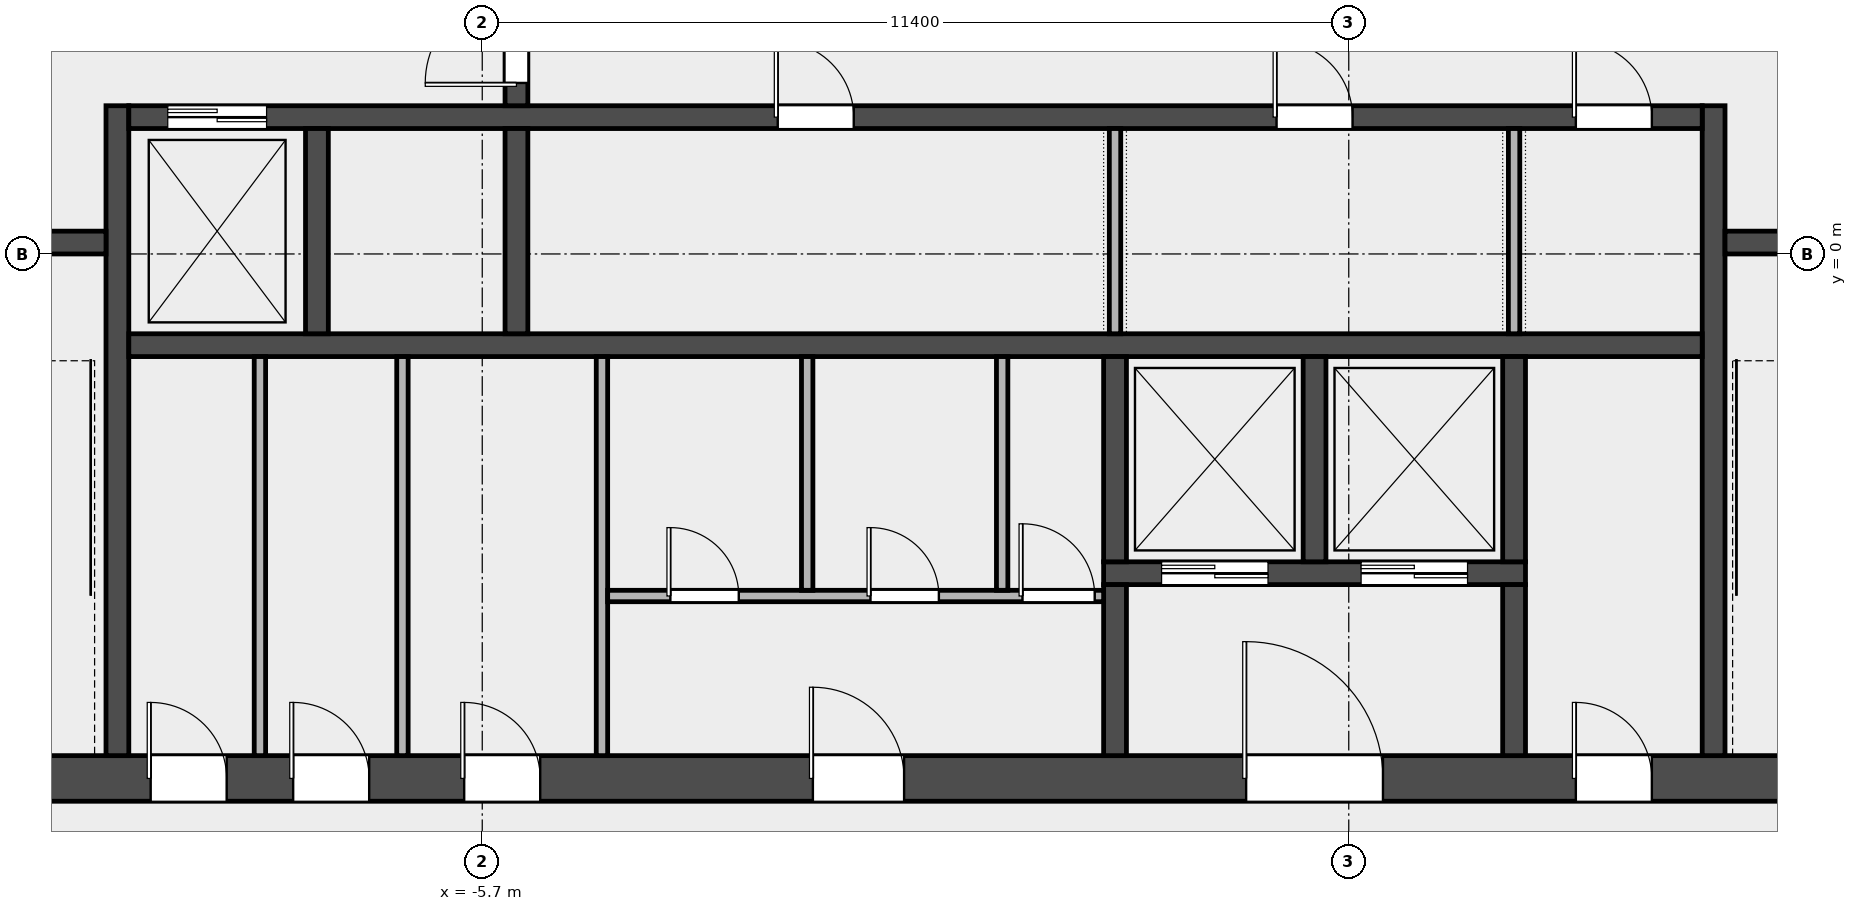
"""IFC4 building model, lengths in metres.
Left out: names, types, materials, properties, quantities, classifications, styles, units other than length and angle.
Written with IfcOpenShell. Run it as: python <this file> out.ifc"""

import sys

from ifc_helpers import new_model, si_unit, direction, frame, frame_2d, origin, place, context, subcontext, project, spatial, rectangle, extrude, element, fill, save


model = new_model("IFC4")
c1 = context("Model", 3, precision=1e-05, world=origin(), true_north=direction((0.0, 1.0)))
c2 = subcontext(c1, "Body", "Model", "MODEL_VIEW")
j1 = project(units=[si_unit("LENGTHUNIT", "METRE"), si_unit("PLANEANGLEUNIT", "RADIAN")], contexts=[c1])
p1 = place(None, origin())
s1 = spatial("IfcSite", under=j1, at=p1, CompositionType="ELEMENT")
p2 = place(p1, origin())
s2 = spatial("IfcBuilding", under=s1, at=p2, CompositionType="ELEMENT")
p3 = place(p2, frame((0.0, 0.0, 259.0)))
s3 = spatial("IfcBuildingStorey", under=s2, at=p3, CompositionType="ELEMENT", Elevation=259.0)
p4 = place(p3, frame((-14.4, -6.9, 0.0), z_axis=(0.0, 0.0, 1.0), x_axis=(1.0, 0.0, 0.0)))
e1 = element("IfcWall", 1, at=p4, inside=s3, PredefinedType="SHEAR", context=c2, shape_type="SweptSolid", body=[
    extrude(rectangle(XDim=28.8, YDim=0.6, at=frame_2d((14.4, 0.0))), origin(), (0.0, 0.0, 1.0), 8.1),
])
p5 = place(p4, frame((4.337, 0.0, 0.0)))
e2 = element("IfcOpeningElement", 2, at=p5, cuts=e1, PredefinedType="OPENING", context=c2, shape_type="SweptSolid", body=[
    extrude(rectangle(XDim=1.0, YDim=2.1, at=frame_2d((0.5, 1.05))), frame((0.0, 0.312, 0.0), z_axis=(0.0, -1.0, 0.0), x_axis=(1.0, 0.0, 0.0)), (0.0, 0.0, 1.0), 0.624),
])
p6 = place(p4, frame((6.212, 0.0, 0.0)))
e3 = element("IfcOpeningElement", 3, at=p6, cuts=e1, PredefinedType="OPENING", context=c2, shape_type="SweptSolid", body=[
    extrude(rectangle(XDim=1.0, YDim=2.1, at=frame_2d((0.5, 1.05))), frame((0.0, 0.312, 0.0), z_axis=(0.0, -1.0, 0.0), x_axis=(1.0, 0.0, 0.0)), (0.0, 0.0, 1.0), 0.624),
])
p7 = place(p4, frame((8.462, 0.0, 0.0)))
e4 = element("IfcOpeningElement", 4, at=p7, cuts=e1, PredefinedType="OPENING", context=c2, shape_type="SweptSolid", body=[
    extrude(rectangle(XDim=1.0, YDim=2.1, at=frame_2d((0.5, 1.05))), frame((0.0, 0.312, 0.0), z_axis=(0.0, -1.0, 0.0), x_axis=(1.0, 0.0, 0.0)), (0.0, 0.0, 1.0), 0.624),
])
p8 = place(p4, frame((13.05, 0.0, 0.0)))
e5 = element("IfcOpeningElement", 5, at=p8, cuts=e1, PredefinedType="OPENING", context=c2, shape_type="SweptSolid", body=[
    extrude(rectangle(XDim=1.2, YDim=2.1, at=frame_2d((0.6, 1.05))), frame((0.0, 0.312, 0.0), z_axis=(0.0, -1.0, 0.0), x_axis=(1.0, 0.0, 0.0)), (0.0, 0.0, 1.0), 0.624),
])
p9 = place(p4, frame((18.75, 0.0, 0.0)))
e6 = element("IfcOpeningElement", 6, at=p9, cuts=e1, PredefinedType="OPENING", context=c2, shape_type="SweptSolid", body=[
    extrude(rectangle(XDim=1.8, YDim=2.1, at=frame_2d((0.9, 1.05))), frame((0.0, 0.312, 0.0), z_axis=(0.0, -1.0, 0.0), x_axis=(1.0, 0.0, 0.0)), (0.0, 0.0, 1.0), 0.624),
])
p10 = place(p4, frame((23.087, 0.0, 0.0)))
e7 = element("IfcOpeningElement", 7, at=p10, cuts=e1, PredefinedType="OPENING", context=c2, shape_type="SweptSolid", body=[
    extrude(rectangle(XDim=1.0, YDim=2.1, at=frame_2d((0.5, 1.05))), frame((0.0, 0.312, 0.0), z_axis=(0.0, -1.0, 0.0), x_axis=(1.0, 0.0, 0.0)), (0.0, 0.0, 1.0), 0.624),
])
for number, where, z_axis, x_axis in (
    (8, (-10.5, -6.6, 0.0), (0.0, 0.0, 1.0), (0.0, 1.0, 0.0)),
    (9, (10.5, -6.6, 0.0), (0.0, 0.0, 1.0), (0.0, 1.0, 0.0)),
):
    element("IfcWall", number, at=place(p3, frame(where, z_axis=z_axis, x_axis=x_axis)), inside=s3, PredefinedType="SHEAR", context=c2, shape_type="SweptSolid", body=[
        extrude(rectangle(XDim=8.55, YDim=0.3, at=frame_2d((4.275, 0.0))), origin(), (0.0, 0.0, 1.0), 8.1),
    ])
p11 = place(p3, frame((-13.8, 0.15, 0.0), z_axis=(0.0, 0.0, 1.0), x_axis=(1.0, 0.0, 0.0)))
e10 = element("IfcWall", 10, at=p11, inside=s3, PredefinedType="SOLIDWALL", context=c2, shape_type="SweptSolid", body=[
    extrude(rectangle(XDim=3.15, YDim=0.3, at=frame_2d((1.575, 0.0))), origin(), (0.0, 0.0, 1.0), 8.1),
])
p12 = place(p11, frame((0.975, 0.0, 0.0)))
e11 = element("IfcOpeningElement", 11, at=p12, cuts=e10, PredefinedType="OPENING", context=c2, shape_type="SweptSolid", body=[
    extrude(rectangle(XDim=1.1, YDim=2.1, at=frame_2d((0.55, 1.05))), frame((0.0, 0.162, 0.0), z_axis=(0.0, -1.0, 0.0), x_axis=(1.0, 0.0, 0.0)), (0.0, 0.0, 1.0), 0.324),
])
p13 = place(p3, frame((10.65, 0.15, 0.0), z_axis=(0.0, 0.0, 1.0), x_axis=(1.0, 0.0, 0.0)))
e12 = element("IfcWall", 12, at=p13, inside=s3, PredefinedType="SOLIDWALL", context=c2, shape_type="SweptSolid", body=[
    extrude(rectangle(XDim=3.15, YDim=0.3, at=frame_2d((1.575, 0.0))), origin(), (0.0, 0.0, 1.0), 8.1),
])
p14 = place(p13, frame((1.025, 0.0, 0.0)))
e13 = element("IfcOpeningElement", 13, at=p14, cuts=e12, PredefinedType="OPENING", context=c2, shape_type="SweptSolid", body=[
    extrude(rectangle(XDim=1.1, YDim=2.1, at=frame_2d((0.55, 1.05))), frame((0.0, 0.162, 0.0), z_axis=(0.0, -1.0, 0.0), x_axis=(1.0, 0.0, 0.0)), (0.0, 0.0, 1.0), 0.324),
])
p15 = place(p3, frame((-10.35, -1.2, 0.0), z_axis=(0.0, 0.0, 1.0), x_axis=(1.0, 0.0, 0.0)))
e14 = element("IfcWall", 14, at=p15, inside=s3, PredefinedType="SOLIDWALL", context=c2, shape_type="SweptSolid", body=[
    extrude(rectangle(XDim=20.7, YDim=0.3, at=frame_2d((10.35, 0.0))), origin(), (0.0, 0.0, 1.0), 8.1),
])
p16 = place(p3, frame((-10.35, 1.8, 0.0), z_axis=(0.0, 0.0, 1.0), x_axis=(1.0, 0.0, 0.0)))
e15 = element("IfcWall", 15, at=p16, inside=s3, PredefinedType="SOLIDWALL", context=c2, shape_type="SweptSolid", body=[
    extrude(rectangle(XDim=20.7, YDim=0.3, at=frame_2d((10.35, 0.0))), origin(), (0.0, 0.0, 1.0), 8.1),
])
p17 = place(p16, frame((0.512, 0.0, 0.0)))
e16 = element("IfcOpeningElement", 16, at=p17, cuts=e15, PredefinedType="OPENING", context=c2, shape_type="SweptSolid", body=[
    extrude(rectangle(XDim=1.3, YDim=2.1, at=frame_2d((0.65, 1.05))), frame((0.0, 0.162, 0.0), z_axis=(0.0, -1.0, 0.0), x_axis=(1.0, 0.0, 0.0)), (0.0, 0.0, 1.0), 0.324),
])
p18 = place(p16, frame((8.538, 0.0, 0.0)))
e17 = element("IfcOpeningElement", 17, at=p18, cuts=e15, PredefinedType="OPENING", context=c2, shape_type="SweptSolid", body=[
    extrude(rectangle(XDim=1.0, YDim=2.1, at=frame_2d((0.5, 1.05))), frame((0.0, 0.162, 0.0), z_axis=(0.0, -1.0, 0.0), x_axis=(1.0, 0.0, 0.0)), (0.0, 0.0, 1.0), 0.324),
])
p19 = place(p16, frame((15.1, 0.0, 0.0)))
e18 = element("IfcOpeningElement", 18, at=p19, cuts=e15, PredefinedType="OPENING", context=c2, shape_type="SweptSolid", body=[
    extrude(rectangle(XDim=1.0, YDim=2.1, at=frame_2d((0.5, 1.05))), frame((0.0, 0.162, 0.0), z_axis=(0.0, -1.0, 0.0), x_axis=(1.0, 0.0, 0.0)), (0.0, 0.0, 1.0), 0.324),
])
p20 = place(p16, frame((19.038, 0.0, 0.0)))
e19 = element("IfcOpeningElement", 19, at=p20, cuts=e15, PredefinedType="OPENING", context=c2, shape_type="SweptSolid", body=[
    extrude(rectangle(XDim=1.0, YDim=2.1, at=frame_2d((0.5, 1.05))), frame((0.0, 0.162, 0.0), z_axis=(0.0, -1.0, 0.0), x_axis=(1.0, 0.0, 0.0)), (0.0, 0.0, 1.0), 0.324),
])
for number, where, z_axis, x_axis in (
    (20, (-7.875, -1.05, 0.0), (0.0, 0.0, 1.0), (0.0, 1.0, 0.0)),
    (21, (-5.25, -1.05, 0.0), (0.0, 0.0, 1.0), (0.0, 1.0, 0.0)),
):
    element("IfcWall", number, at=place(p3, frame(where, z_axis=z_axis, x_axis=x_axis)), inside=s3, PredefinedType="SOLIDWALL", context=c2, shape_type="SweptSolid", body=[
        extrude(rectangle(XDim=2.7, YDim=0.3, at=frame_2d((1.35, 0.0))), origin(), (0.0, 0.0, 1.0), 8.1),
    ])
p21 = place(p3, frame((-5.25, 1.95, 0.0), z_axis=(0.0, 0.0, 1.0), x_axis=(0.0, 1.0, 0.0)))
e22 = element("IfcWall", 22, at=p21, inside=s3, PredefinedType="SOLIDWALL", context=c2, shape_type="SweptSolid", body=[
    extrude(rectangle(XDim=3.3, YDim=0.3, at=frame_2d((1.65, 0.0))), origin(), (0.0, 0.0, 1.0), 8.1),
])
p22 = place(p21, frame((0.3, 0.0, 0.0)))
e23 = element("IfcOpeningElement", 23, at=p22, cuts=e22, PredefinedType="OPENING", context=c2, shape_type="SweptSolid", body=[
    extrude(rectangle(XDim=1.2, YDim=2.1, at=frame_2d((0.6, 1.05))), frame((0.0, 0.162, 0.0), z_axis=(0.0, -1.0, 0.0), x_axis=(1.0, 0.0, 0.0)), (0.0, 0.0, 1.0), 0.324),
])
p23 = place(p21, frame((1.8, 0.0, 0.0)))
e24 = element("IfcOpeningElement", 24, at=p23, cuts=e22, PredefinedType="OPENING", context=c2, shape_type="SweptSolid", body=[
    extrude(rectangle(XDim=1.2, YDim=2.1, at=frame_2d((0.6, 1.05))), frame((0.0, 0.162, 0.0), z_axis=(0.0, -1.0, 0.0), x_axis=(1.0, 0.0, 0.0)), (0.0, 0.0, 1.0), 0.324),
])
p24 = place(p3, frame((2.475, -4.2, 0.0), z_axis=(0.0, 0.0, 1.0), x_axis=(1.0, 0.0, 0.0)))
e25 = element("IfcWall", 25, at=p24, inside=s3, PredefinedType="SOLIDWALL", context=c2, shape_type="SweptSolid", body=[
    extrude(rectangle(XDim=5.55, YDim=0.3, at=frame_2d((2.775, 0.0))), origin(), (0.0, 0.0, 1.0), 8.1),
])
p25 = place(p24, frame((0.762, 0.0, 0.0)))
e26 = element("IfcOpeningElement", 26, at=p25, cuts=e25, PredefinedType="OPENING", context=c2, shape_type="SweptSolid", body=[
    extrude(rectangle(XDim=1.4, YDim=2.1, at=frame_2d((0.7, 1.05))), frame((0.0, 0.162, 0.0), z_axis=(0.0, -1.0, 0.0), x_axis=(1.0, 0.0, 0.0)), (0.0, 0.0, 1.0), 0.324),
])
p26 = place(p24, frame((3.387, 0.0, 0.0)))
e27 = element("IfcOpeningElement", 27, at=p26, cuts=e25, PredefinedType="OPENING", context=c2, shape_type="SweptSolid", body=[
    extrude(rectangle(XDim=1.4, YDim=2.1, at=frame_2d((0.7, 1.05))), frame((0.0, 0.162, 0.0), z_axis=(0.0, -1.0, 0.0), x_axis=(1.0, 0.0, 0.0)), (0.0, 0.0, 1.0), 0.324),
])
p27 = place(p3, frame((2.625, -4.05, 0.0), z_axis=(0.0, 0.0, 1.0), x_axis=(0.0, 1.0, 0.0)))
e28 = element("IfcWall", 28, at=p27, inside=s3, PredefinedType="SOLIDWALL", context=c2, shape_type="SweptSolid", body=[
    extrude(rectangle(XDim=2.7, YDim=0.3, at=frame_2d((1.35, 0.0))), origin(), (0.0, 0.0, 1.0), 8.1),
])
p28 = place(p3, frame((2.625, -6.6, 0.0), z_axis=(0.0, 0.0, 1.0), x_axis=(0.0, 1.0, 0.0)))
e29 = element("IfcWall", 29, at=p28, inside=s3, PredefinedType="SOLIDWALL", context=c2, shape_type="SweptSolid", body=[
    extrude(rectangle(XDim=2.25, YDim=0.3, at=frame_2d((1.125, 0.0))), origin(), (0.0, 0.0, 1.0), 8.1),
])
for number, where, z_axis, x_axis in (
    (30, (5.25, -4.05, 0.0), (0.0, 0.0, 1.0), (0.0, 1.0, 0.0)),
    (31, (7.875, -4.05, 0.0), (0.0, 0.0, 1.0), (0.0, 1.0, 0.0)),
):
    element("IfcWall", number, at=place(p3, frame(where, z_axis=z_axis, x_axis=x_axis)), inside=s3, PredefinedType="SOLIDWALL", context=c2, shape_type="SweptSolid", body=[
        extrude(rectangle(XDim=2.7, YDim=0.3, at=frame_2d((1.35, 0.0))), origin(), (0.0, 0.0, 1.0), 8.1),
    ])
p29 = place(p3, frame((7.875, -6.6, 0.0), z_axis=(0.0, 0.0, 1.0), x_axis=(0.0, 1.0, 0.0)))
e32 = element("IfcWall", 32, at=p29, inside=s3, PredefinedType="SOLIDWALL", context=c2, shape_type="SweptSolid", body=[
    extrude(rectangle(XDim=2.25, YDim=0.3, at=frame_2d((1.125, 0.0))), origin(), (0.0, 0.0, 1.0), 8.1),
])
for number, where, z_axis, x_axis in (
    (33, (-8.625, -6.6, 0.0), (0.0, 0.0, 1.0), (0.0, 1.0, 0.0)),
    (34, (-6.75, -6.6, 0.0), (0.0, 0.0, 1.0), (0.0, 1.0, 0.0)),
    (35, (-4.125, -6.6, 0.0), (0.0, 0.0, 1.0), (0.0, 1.0, 0.0)),
):
    element("IfcWall", number, at=place(p3, frame(where, z_axis=z_axis, x_axis=x_axis)), inside=s3, PredefinedType="PARTITIONING", context=c2, shape_type="SweptSolid", body=[
        extrude(rectangle(XDim=5.25, YDim=0.15, at=frame_2d((2.625, 0.0))), origin(), (0.0, 0.0, 1.0), 8.1),
    ])
p30 = place(p3, frame((-4.05, -4.5, 0.0), z_axis=(0.0, 0.0, 1.0), x_axis=(1.0, 0.0, 0.0)))
e36 = element("IfcWall", 36, at=p30, inside=s3, PredefinedType="PARTITIONING", context=c2, shape_type="SweptSolid", body=[
    extrude(rectangle(XDim=6.525, YDim=0.15, at=frame_2d((3.263, 0.0))), origin(), (0.0, 0.0, 1.0), 8.1),
])
p31 = place(p30, frame((0.825, 0.0, 0.0)))
e37 = element("IfcOpeningElement", 37, at=p31, cuts=e36, PredefinedType="OPENING", context=c2, shape_type="SweptSolid", body=[
    extrude(rectangle(XDim=0.9, YDim=2.1, at=frame_2d((0.45, 1.05))), frame((0.0, 0.087, 0.0), z_axis=(0.0, -1.0, 0.0), x_axis=(1.0, 0.0, 0.0)), (0.0, 0.0, 1.0), 0.174),
])
p32 = place(p30, frame((3.458, 0.0, 0.0)))
e38 = element("IfcOpeningElement", 38, at=p32, cuts=e36, PredefinedType="OPENING", context=c2, shape_type="SweptSolid", body=[
    extrude(rectangle(XDim=0.9, YDim=2.1, at=frame_2d((0.45, 1.05))), frame((0.0, 0.087, 0.0), z_axis=(0.0, -1.0, 0.0), x_axis=(1.0, 0.0, 0.0)), (0.0, 0.0, 1.0), 0.174),
])
p33 = place(p30, frame((5.458, 0.0, 0.0)))
e39 = element("IfcOpeningElement", 39, at=p33, cuts=e36, PredefinedType="OPENING", context=c2, shape_type="SweptSolid", body=[
    extrude(rectangle(XDim=0.95, YDim=2.1, at=frame_2d((0.475, 1.05))), frame((0.0, 0.087, 0.0), z_axis=(0.0, -1.0, 0.0), x_axis=(1.0, 0.0, 0.0)), (0.0, 0.0, 1.0), 0.174),
])
for number, where, z_axis, x_axis in (
    (40, (-1.425, -4.425, 0.0), (0.0, 0.0, 1.0), (0.0, 1.0, 0.0)),
    (41, (1.14, -4.425, 0.0), (0.0, 0.0, 1.0), (0.0, 1.0, 0.0)),
):
    element("IfcWall", number, at=place(p3, frame(where, z_axis=z_axis, x_axis=x_axis)), inside=s3, PredefinedType="PARTITIONING", context=c2, shape_type="SweptSolid", body=[
        extrude(rectangle(XDim=3.075, YDim=0.15, at=frame_2d((1.538, 0.0))), origin(), (0.0, 0.0, 1.0), 8.1),
    ])
for number, where, z_axis, x_axis in (
    (42, (2.625, -1.05, 0.0), (0.0, 0.0, 1.0), (0.0, 1.0, 0.0)),
    (43, (7.875, -1.05, 0.0), (0.0, 0.0, 1.0), (0.0, 1.0, 0.0)),
):
    element("IfcWall", number, at=place(p3, frame(where, z_axis=z_axis, x_axis=x_axis)), inside=s3, PredefinedType="PARTITIONING", context=c2, shape_type="SweptSolid", body=[
        extrude(rectangle(XDim=2.7, YDim=0.15, at=frame_2d((1.35, 0.0))), origin(), (0.0, 0.0, 1.0), 8.1),
    ])
p34 = place(p22, origin())
e44 = element("IfcDoor", 44, at=p34, inside=s3, OperationType="SINGLE_SWING_LEFT", PredefinedType="DOOR", context=c2, shape_type="SweptSolid", body=[
    extrude(rectangle(XDim=1.2, YDim=2.1, at=frame_2d((0.6, 1.05))), frame((0.0, 0.025, 0.0), z_axis=(0.0, -1.0, 0.0), x_axis=(1.0, 0.0, 0.0)), (0.0, 0.0, 1.0), 0.05),
])
fill(e23, e44)
p35 = place(p17, origin())
e45 = element("IfcDoor", 45, at=p35, inside=s3, OperationType="DOUBLE_DOOR_SLIDING", PredefinedType="DOOR", context=c2, shape_type="SweptSolid", body=[
    extrude(rectangle(XDim=1.3, YDim=2.1, at=frame_2d((0.65, 1.05))), frame((0.0, 0.025, 0.0), z_axis=(0.0, -1.0, 0.0), x_axis=(1.0, 0.0, 0.0)), (0.0, 0.0, 1.0), 0.05),
])
fill(e16, e45)
p36 = place(p25, origin())
e46 = element("IfcDoor", 46, at=p36, inside=s3, OperationType="DOUBLE_DOOR_SLIDING", PredefinedType="DOOR", context=c2, shape_type="SweptSolid", body=[
    extrude(rectangle(XDim=1.4, YDim=2.1, at=frame_2d((0.7, 1.05))), frame((0.0, 0.025, 0.0), z_axis=(0.0, -1.0, 0.0), x_axis=(1.0, 0.0, 0.0)), (0.0, 0.0, 1.0), 0.05),
])
fill(e26, e46)
p37 = place(p26, origin())
e47 = element("IfcDoor", 47, at=p37, inside=s3, OperationType="DOUBLE_DOOR_SLIDING", PredefinedType="DOOR", context=c2, shape_type="SweptSolid", body=[
    extrude(rectangle(XDim=1.4, YDim=2.1, at=frame_2d((0.7, 1.05))), frame((0.0, 0.025, 0.0), z_axis=(0.0, -1.0, 0.0), x_axis=(1.0, 0.0, 0.0)), (0.0, 0.0, 1.0), 0.05),
])
fill(e27, e47)
p38 = place(p5, origin())
e48 = element("IfcDoor", 48, at=p38, inside=s3, OperationType="SINGLE_SWING_LEFT", PredefinedType="DOOR", context=c2, shape_type="SweptSolid", body=[
    extrude(rectangle(XDim=1.0, YDim=2.1, at=frame_2d((0.5, 1.05))), frame((0.0, 0.025, 0.0), z_axis=(0.0, -1.0, 0.0), x_axis=(1.0, 0.0, 0.0)), (0.0, 0.0, 1.0), 0.05),
])
fill(e2, e48)
p39 = place(p6, origin())
e49 = element("IfcDoor", 49, at=p39, inside=s3, OperationType="SINGLE_SWING_LEFT", PredefinedType="DOOR", context=c2, shape_type="SweptSolid", body=[
    extrude(rectangle(XDim=1.0, YDim=2.1, at=frame_2d((0.5, 1.05))), frame((0.0, 0.025, 0.0), z_axis=(0.0, -1.0, 0.0), x_axis=(1.0, 0.0, 0.0)), (0.0, 0.0, 1.0), 0.05),
])
fill(e3, e49)
p40 = place(p7, origin())
e50 = element("IfcDoor", 50, at=p40, inside=s3, OperationType="SINGLE_SWING_LEFT", PredefinedType="DOOR", context=c2, shape_type="SweptSolid", body=[
    extrude(rectangle(XDim=1.0, YDim=2.1, at=frame_2d((0.5, 1.05))), frame((0.0, 0.025, 0.0), z_axis=(0.0, -1.0, 0.0), x_axis=(1.0, 0.0, 0.0)), (0.0, 0.0, 1.0), 0.05),
])
fill(e4, e50)
p41 = place(p8, origin())
e51 = element("IfcDoor", 51, at=p41, inside=s3, OperationType="SINGLE_SWING_LEFT", PredefinedType="DOOR", context=c2, shape_type="SweptSolid", body=[
    extrude(rectangle(XDim=1.2, YDim=2.1, at=frame_2d((0.6, 1.05))), frame((0.0, 0.025, 0.0), z_axis=(0.0, -1.0, 0.0), x_axis=(1.0, 0.0, 0.0)), (0.0, 0.0, 1.0), 0.05),
])
fill(e5, e51)
p42 = place(p31, origin())
e52 = element("IfcDoor", 52, at=p42, inside=s3, OperationType="SINGLE_SWING_LEFT", PredefinedType="DOOR", context=c2, shape_type="SweptSolid", body=[
    extrude(rectangle(XDim=0.9, YDim=2.1, at=frame_2d((0.45, 1.05))), frame((0.0, 0.025, 0.0), z_axis=(0.0, -1.0, 0.0), x_axis=(1.0, 0.0, 0.0)), (0.0, 0.0, 1.0), 0.05),
])
fill(e37, e52)
p43 = place(p32, origin())
e53 = element("IfcDoor", 53, at=p43, inside=s3, OperationType="SINGLE_SWING_LEFT", PredefinedType="DOOR", context=c2, shape_type="SweptSolid", body=[
    extrude(rectangle(XDim=0.9, YDim=2.1, at=frame_2d((0.45, 1.05))), frame((0.0, 0.025, 0.0), z_axis=(0.0, -1.0, 0.0), x_axis=(1.0, 0.0, 0.0)), (0.0, 0.0, 1.0), 0.05),
])
fill(e38, e53)
p44 = place(p33, origin())
e54 = element("IfcDoor", 54, at=p44, inside=s3, OperationType="SINGLE_SWING_LEFT", PredefinedType="DOOR", context=c2, shape_type="SweptSolid", body=[
    extrude(rectangle(XDim=0.95, YDim=2.1, at=frame_2d((0.475, 1.05))), frame((0.0, 0.025, 0.0), z_axis=(0.0, -1.0, 0.0), x_axis=(1.0, 0.0, 0.0)), (0.0, 0.0, 1.0), 0.05),
])
fill(e39, e54)
p45 = place(p9, origin())
e55 = element("IfcDoor", 55, at=p45, inside=s3, OperationType="DOUBLE_DOOR_SINGLE_SWING", PredefinedType="DOOR", context=c2, shape_type="SweptSolid", body=[
    extrude(rectangle(XDim=1.8, YDim=2.1, at=frame_2d((0.9, 1.05))), frame((0.0, 0.025, 0.0), z_axis=(0.0, -1.0, 0.0), x_axis=(1.0, 0.0, 0.0)), (0.0, 0.0, 1.0), 0.05),
])
fill(e6, e55)
p46 = place(p10, origin())
e56 = element("IfcDoor", 56, at=p46, inside=s3, OperationType="SINGLE_SWING_LEFT", PredefinedType="DOOR", context=c2, shape_type="SweptSolid", body=[
    extrude(rectangle(XDim=1.0, YDim=2.1, at=frame_2d((0.5, 1.05))), frame((0.0, 0.025, 0.0), z_axis=(0.0, -1.0, 0.0), x_axis=(1.0, 0.0, 0.0)), (0.0, 0.0, 1.0), 0.05),
])
fill(e7, e56)
p47 = place(p18, origin())
e57 = element("IfcDoor", 57, at=p47, inside=s3, OperationType="SINGLE_SWING_LEFT", PredefinedType="DOOR", context=c2, shape_type="SweptSolid", body=[
    extrude(rectangle(XDim=1.0, YDim=2.1, at=frame_2d((0.5, 1.05))), frame((0.0, 0.025, 0.0), z_axis=(0.0, -1.0, 0.0), x_axis=(1.0, 0.0, 0.0)), (0.0, 0.0, 1.0), 0.05),
])
fill(e17, e57)
p48 = place(p19, origin())
e58 = element("IfcDoor", 58, at=p48, inside=s3, OperationType="SINGLE_SWING_LEFT", PredefinedType="DOOR", context=c2, shape_type="SweptSolid", body=[
    extrude(rectangle(XDim=1.0, YDim=2.1, at=frame_2d((0.5, 1.05))), frame((0.0, 0.025, 0.0), z_axis=(0.0, -1.0, 0.0), x_axis=(1.0, 0.0, 0.0)), (0.0, 0.0, 1.0), 0.05),
])
fill(e18, e58)
p49 = place(p20, origin())
e59 = element("IfcDoor", 59, at=p49, inside=s3, OperationType="SINGLE_SWING_LEFT", PredefinedType="DOOR", context=c2, shape_type="SweptSolid", body=[
    extrude(rectangle(XDim=1.0, YDim=2.1, at=frame_2d((0.5, 1.05))), frame((0.0, 0.025, 0.0), z_axis=(0.0, -1.0, 0.0), x_axis=(1.0, 0.0, 0.0)), (0.0, 0.0, 1.0), 0.05),
])
fill(e19, e59)
save(model, sys.argv[1])
